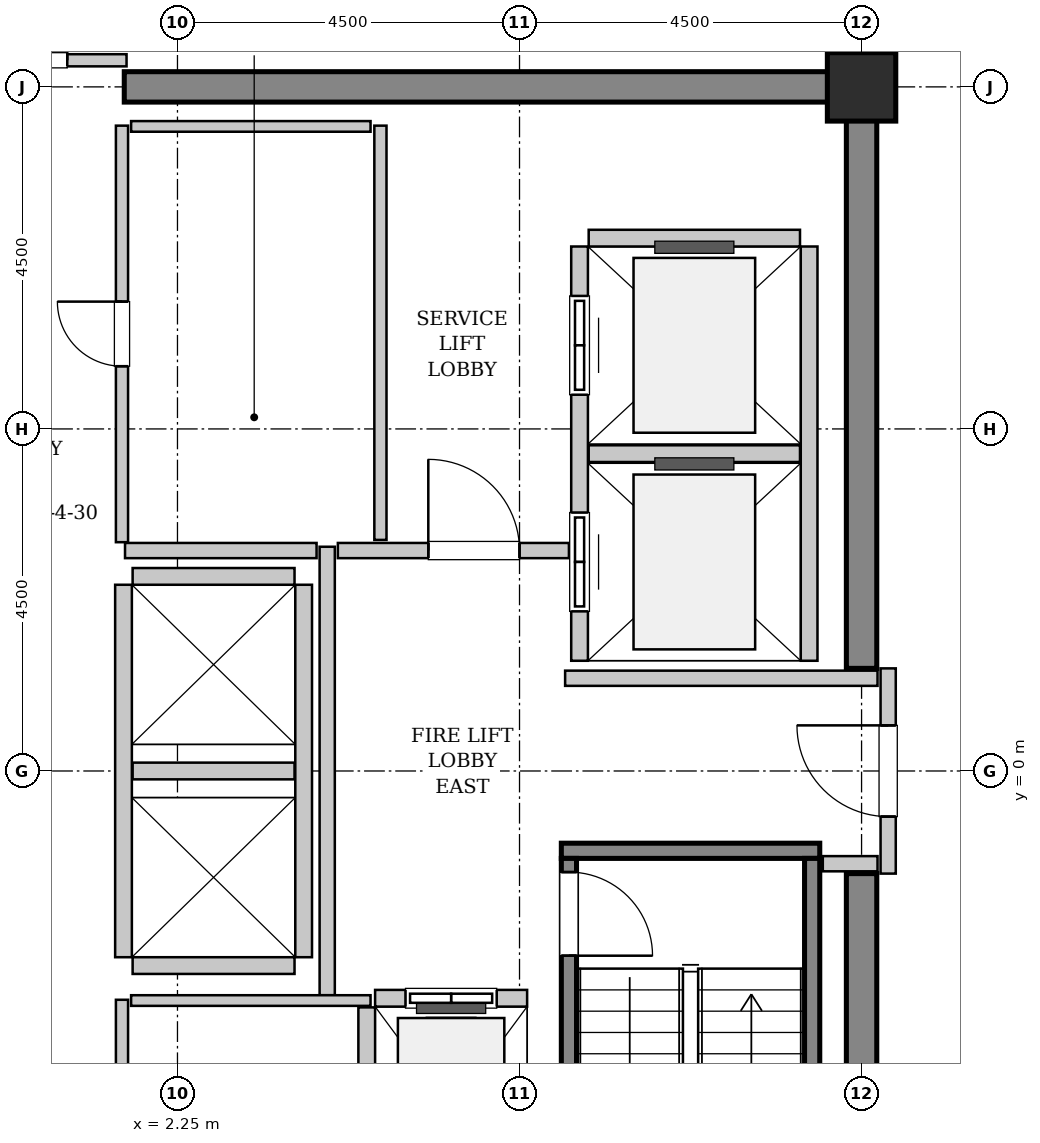
"""IFC4 building model, lengths in metres.
Left out: names, types, materials, properties, quantities, classifications, styles, units other than length and angle.
Written with IfcOpenShell. Run it as: python <this file> out.ifc"""

import sys

from ifc_helpers import new_model, si_unit, direction, frame, frame_2d, origin, origin_2d, place, context, subcontext, project, spatial, rectangle, extrude, source, transform, mapped, element, fill, save


model = new_model("IFC4")
c1 = context("Model", 3, precision=1e-05, world=origin(), true_north=direction((0.0, 1.0)))
c2 = subcontext(c1, "Body", "Model", "MODEL_VIEW")
j1 = project(units=[si_unit("LENGTHUNIT", "METRE"), si_unit("PLANEANGLEUNIT", "RADIAN")], contexts=[c1])
p1 = place(None, origin())
s1 = spatial("IfcSite", under=j1, at=p1, CompositionType="ELEMENT")
p2 = place(p1, origin())
s2 = spatial("IfcBuilding", under=s1, at=p2, CompositionType="ELEMENT")
p3 = place(p2, frame((0.0, 0.0, 337.6)))
s3 = spatial("IfcBuildingStorey", under=s2, at=p3, CompositionType="ELEMENT", Elevation=337.6)
m1 = source(origin(), c2, "Body", "SweptSolid", [
    extrude(rectangle(XDim=9.9, YDim=0.4, at=frame_2d((4.95, 0.0))), origin(), (0.0, 0.0, 1.0), 3.8),
])
p4 = place(p3, frame((1.55, 9.0, 0.0), z_axis=(0.0, 0.0, 1.0), x_axis=(1.0, 0.0, 0.0)))
e1 = element("IfcWall", 1, at=p4, inside=s3, PredefinedType="SHEAR", context=c2, shape_type="MappedRepresentation", body=[
    mapped(m1, transform((0.0, 0.0, 0.0), x_axis=(1.0, 0.0, 0.0), y_axis=(0.0, 1.0, 0.0), z_axis=(0.0, 0.0, 1.0), scale=1.0)),
])
m2 = source(origin(), c2, "Body", "SweptSolid", [
    extrude(rectangle(XDim=7.45, YDim=0.4, at=frame_2d((3.725, 0.0))), origin(), (0.0, 0.0, 1.0), 3.8),
])
for number, where, z_axis, x_axis in (
    (2, (11.25, -8.8, 0.0), (0.0, 0.0, 1.0), (0.0, 1.0, 0.0)),
    (3, (11.25, 1.35, 0.0), (0.0, 0.0, 1.0), (0.0, 1.0, 0.0)),
):
    element("IfcWall", number, at=place(p3, frame(where, z_axis=z_axis, x_axis=x_axis)), inside=s3, PredefinedType="SHEAR", context=c2, shape_type="MappedRepresentation", body=[
        mapped(m2, transform((0.0, 0.0, 0.0), x_axis=(1.0, 0.0, 0.0), y_axis=(0.0, 1.0, 0.0), z_axis=(0.0, 0.0, 1.0), scale=1.0)),
    ])
m3 = source(origin(), c2, "Body", "SweptSolid", [
    extrude(rectangle(XDim=0.9, YDim=0.9, at=origin_2d()), origin(), (0.0, 0.0, 1.0), 3.8),
])
p5 = place(p3, frame((11.25, 9.0, 0.0), z_axis=(0.0, 0.0, 1.0), x_axis=(1.0, 0.0, 0.0)))
e4 = element("IfcColumn", 4, at=p5, inside=s3, PredefinedType="COLUMN", context=c2, shape_type="MappedRepresentation", body=[
    mapped(m3, transform((0.0, 0.0, 0.0), x_axis=(1.0, 0.0, 0.0), y_axis=(0.0, 1.0, 0.0), z_axis=(0.0, 0.0, 1.0), scale=1.0)),
])
m4 = source(origin(), c2, "Body", "SweptSolid", [
    extrude(rectangle(XDim=3.4, YDim=0.2, at=frame_2d((1.7, 0.0))), origin(), (0.0, 0.0, 1.0), 3.8),
])
p6 = place(p3, frame((7.3, -1.05, 0.0), z_axis=(0.0, 0.0, 1.0), x_axis=(1.0, 0.0, 0.0)))
e5 = element("IfcWall", 5, at=p6, inside=s3, PredefinedType="SOLIDWALL", context=c2, shape_type="MappedRepresentation", body=[
    mapped(m4, transform((0.0, 0.0, 0.0), x_axis=(1.0, 0.0, 0.0), y_axis=(0.0, 1.0, 0.0), z_axis=(0.0, 0.0, 1.0), scale=1.0)),
])
m5 = source(origin(), c2, "Body", "SweptSolid", [
    extrude(rectangle(XDim=7.1, YDim=0.2, at=frame_2d((3.55, 0.0))), origin(), (0.0, 0.0, 1.0), 3.8),
])
p7 = place(p3, frame((7.4, -1.15, 0.0), z_axis=(0.0, 0.0, 1.0), x_axis=(0.0, -1.0, 0.0)))
e6 = element("IfcWall", 6, at=p7, inside=s3, PredefinedType="SOLIDWALL", context=c2, shape_type="MappedRepresentation", body=[
    mapped(m5, transform((0.0, 0.0, 0.0), x_axis=(1.0, 0.0, 0.0), y_axis=(0.0, 1.0, 0.0), z_axis=(0.0, 0.0, 1.0), scale=1.0)),
])
p8 = place(p7, frame((0.18, 0.0, 0.0)))
e7 = element("IfcOpeningElement", 7, at=p8, cuts=e6, PredefinedType="OPENING", context=c2, shape_type="SweptSolid", body=[
    extrude(rectangle(XDim=1.1, YDim=2.15, at=frame_2d((0.55, 1.075))), frame((0.0, 0.11, 0.0), z_axis=(0.0, -1.0, 0.0), x_axis=(1.0, 0.0, 0.0)), (0.0, 0.0, 1.0), 0.22),
])
p9 = place(p3, frame((10.6, -1.15, 0.0), z_axis=(0.0, 0.0, 1.0), x_axis=(0.0, -1.0, 0.0)))
e8 = element("IfcWall", 8, at=p9, inside=s3, PredefinedType="SOLIDWALL", context=c2, shape_type="MappedRepresentation", body=[
    mapped(m5, transform((0.0, 0.0, 0.0), x_axis=(1.0, 0.0, 0.0), y_axis=(0.0, 1.0, 0.0), z_axis=(0.0, 0.0, 1.0), scale=1.0)),
])
m6 = source(origin(), c2, "Body", "SweptSolid", [
    extrude(rectangle(XDim=2.0, YDim=0.22, at=frame_2d((1.0, 0.0))), origin(), (0.0, 0.0, 1.0), 3.535),
])
p10 = place(p3, frame((6.85, -2.99, 0.0), z_axis=(0.0, 0.0, 1.0), x_axis=(-1.0, 0.0, 0.0)))
e9 = element("IfcWall", 9, at=p10, inside=s3, PredefinedType="SOLIDWALL", context=c2, shape_type="MappedRepresentation", body=[
    mapped(m6, transform((0.0, 0.0, 0.0), x_axis=(1.0, 0.0, 0.0), y_axis=(0.0, 1.0, 0.0), z_axis=(0.0, 0.0, 1.0), scale=1.0)),
])
p11 = place(p10, frame((0.4, 0.0, 0.0)))
e10 = element("IfcOpeningElement", 10, at=p11, cuts=e9, PredefinedType="OPENING", context=c2, shape_type="SweptSolid", body=[
    extrude(rectangle(XDim=1.2, YDim=2.2, at=frame_2d((0.6, 1.1))), frame((0.0, 0.12, 0.0), z_axis=(0.0, -1.0, 0.0), x_axis=(1.0, 0.0, 0.0)), (0.0, 0.0, 1.0), 0.24),
])
m7 = source(origin(), c2, "Body", "SweptSolid", [
    extrude(rectangle(XDim=2.68, YDim=0.22, at=frame_2d((1.34, 0.0))), origin(), (0.0, 0.0, 1.0), 3.535),
])
p12 = place(p3, frame((4.74, -3.11, 0.0), z_axis=(0.0, 0.0, 1.0), x_axis=(0.0, -1.0, 0.0)))
e11 = element("IfcWall", 11, at=p12, inside=s3, PredefinedType="SOLIDWALL", context=c2, shape_type="MappedRepresentation", body=[
    mapped(m7, transform((0.0, 0.0, 0.0), x_axis=(1.0, 0.0, 0.0), y_axis=(0.0, 1.0, 0.0), z_axis=(0.0, 0.0, 1.0), scale=1.0)),
])
m8 = source(origin(), c2, "Body", "SweptSolid", [
    extrude(rectangle(XDim=5.45, YDim=0.22, at=frame_2d((2.725, 0.0))), origin(), (0.0, 0.0, 1.0), 3.535),
])
p13 = place(p3, frame((7.54, 6.9, 0.0), z_axis=(0.0, 0.0, 1.0), x_axis=(0.0, -1.0, 0.0)))
e12 = element("IfcWall", 12, at=p13, inside=s3, PredefinedType="SOLIDWALL", context=c2, shape_type="MappedRepresentation", body=[
    mapped(m8, transform((0.0, 0.0, 0.0), x_axis=(1.0, 0.0, 0.0), y_axis=(0.0, 1.0, 0.0), z_axis=(0.0, 0.0, 1.0), scale=1.0)),
])
p14 = place(p13, frame((3.5, 0.0, 0.0)))
e13 = element("IfcOpeningElement", 13, at=p14, cuts=e12, PredefinedType="OPENING", context=c2, shape_type="SweptSolid", body=[
    extrude(rectangle(XDim=1.3, YDim=2.3, at=frame_2d((0.65, 1.15))), frame((0.0, 0.12, 0.0), z_axis=(0.0, -1.0, 0.0), x_axis=(1.0, 0.0, 0.0)), (0.0, 0.0, 1.0), 0.24),
])
p15 = place(p13, frame((0.65, 0.0, 0.0)))
e14 = element("IfcOpeningElement", 14, at=p15, cuts=e12, PredefinedType="OPENING", context=c2, shape_type="SweptSolid", body=[
    extrude(rectangle(XDim=1.3, YDim=2.3, at=frame_2d((0.65, 1.15))), frame((0.0, 0.12, 0.0), z_axis=(0.0, -1.0, 0.0), x_axis=(1.0, 0.0, 0.0)), (0.0, 0.0, 1.0), 0.24),
])
p16 = place(p3, frame((10.56, 1.45, 0.0), z_axis=(0.0, 0.0, 1.0), x_axis=(0.0, 1.0, 0.0)))
e15 = element("IfcWall", 15, at=p16, inside=s3, PredefinedType="SOLIDWALL", context=c2, shape_type="MappedRepresentation", body=[
    mapped(m8, transform((0.0, 0.0, 0.0), x_axis=(1.0, 0.0, 0.0), y_axis=(0.0, 1.0, 0.0), z_axis=(0.0, 0.0, 1.0), scale=1.0)),
])
m9 = source(origin(), c2, "Body", "SweptSolid", [
    extrude(rectangle(XDim=2.78, YDim=0.22, at=frame_2d((1.39, 0.0))), origin(), (0.0, 0.0, 1.0), 3.535),
])
for number, where, z_axis, x_axis in (
    (16, (7.66, 4.175, 0.0), (0.0, 0.0, 1.0), (1.0, 0.0, 0.0)),
    (17, (10.44, 7.01, 0.0), (0.0, 0.0, 1.0), (-1.0, 0.0, 0.0)),
):
    element("IfcWall", number, at=place(p3, frame(where, z_axis=z_axis, x_axis=x_axis)), inside=s3, PredefinedType="SOLIDWALL", context=c2, shape_type="MappedRepresentation", body=[
        mapped(m9, transform((0.0, 0.0, 0.0), x_axis=(1.0, 0.0, 0.0), y_axis=(0.0, 1.0, 0.0), z_axis=(0.0, 0.0, 1.0), scale=1.0)),
    ])
m10 = source(origin(), c2, "Body", "SweptSolid", [
    extrude(rectangle(XDim=4.9, YDim=0.22, at=frame_2d((2.45, 0.0))), origin(), (0.0, 0.0, 1.0), 3.535),
])
for number, where, z_axis, x_axis in (
    (18, (1.54, 2.45, 0.0), (0.0, 0.0, 1.0), (0.0, -1.0, 0.0)),
    (19, (3.91, -2.45, 0.0), (0.0, 0.0, 1.0), (0.0, 1.0, 0.0)),
):
    element("IfcWall", number, at=place(p3, frame(where, z_axis=z_axis, x_axis=x_axis)), inside=s3, PredefinedType="SOLIDWALL", context=c2, shape_type="MappedRepresentation", body=[
        mapped(m10, transform((0.0, 0.0, 0.0), x_axis=(1.0, 0.0, 0.0), y_axis=(0.0, 1.0, 0.0), z_axis=(0.0, 0.0, 1.0), scale=1.0)),
    ])
m11 = source(origin(), c2, "Body", "SweptSolid", [
    extrude(rectangle(XDim=2.13, YDim=0.22, at=frame_2d((1.065, 0.0))), origin(), (0.0, 0.0, 1.0), 3.535),
])
for number, where, z_axis, x_axis in (
    (20, (1.66, -2.56, 0.0), (0.0, 0.0, 1.0), (1.0, 0.0, 0.0)),
    (21, (1.66, 0.0, 0.0), (0.0, 0.0, 1.0), (1.0, 0.0, 0.0)),
    (22, (3.79, 2.56, 0.0), (0.0, 0.0, 1.0), (-1.0, 0.0, 0.0)),
):
    element("IfcWall", number, at=place(p3, frame(where, z_axis=z_axis, x_axis=x_axis)), inside=s3, PredefinedType="SOLIDWALL", context=c2, shape_type="MappedRepresentation", body=[
        mapped(m11, transform((0.0, 0.0, 0.0), x_axis=(1.0, 0.0, 0.0), y_axis=(0.0, 1.0, 0.0), z_axis=(0.0, 0.0, 1.0), scale=1.0)),
    ])
m12 = source(origin(), c2, "Body", "SweptSolid", [
    extrude(rectangle(XDim=2.7, YDim=0.2, at=frame_2d((1.35, 0.0))), origin(), (0.0, 0.0, 1.0), 2.625),
])
p17 = place(p3, frame((11.6, -1.35, 0.0), z_axis=(0.0, 0.0, 1.0), x_axis=(0.0, 1.0, 0.0)))
e23 = element("IfcWall", 23, at=p17, inside=s3, PredefinedType="PARTITIONING", context=c2, shape_type="MappedRepresentation", body=[
    mapped(m12, transform((0.0, 0.0, 0.0), x_axis=(1.0, 0.0, 0.0), y_axis=(0.0, 1.0, 0.0), z_axis=(0.0, 0.0, 1.0), scale=1.0)),
])
p18 = place(p17, frame((0.75, 0.0, 0.0)))
e24 = element("IfcOpeningElement", 24, at=p18, cuts=e23, PredefinedType="OPENING", context=c2, shape_type="SweptSolid", body=[
    extrude(rectangle(XDim=1.2, YDim=2.15, at=frame_2d((0.6, 1.075))), frame((0.0, 0.11, 0.0), z_axis=(0.0, -1.0, 0.0), x_axis=(1.0, 0.0, 0.0)), (0.0, 0.0, 1.0), 0.22),
])
m13 = source(origin(), c2, "Body", "SweptSolid", [
    extrude(rectangle(XDim=5.9, YDim=0.2, at=frame_2d((2.95, 0.0))), origin(), (0.0, 0.0, 1.0), 3.535),
])
p19 = place(p3, frame((4.22, -2.95, 0.0), z_axis=(0.0, 0.0, 1.0), x_axis=(0.0, 1.0, 0.0)))
e25 = element("IfcWall", 25, at=p19, inside=s3, PredefinedType="PARTITIONING", context=c2, shape_type="MappedRepresentation", body=[
    mapped(m13, transform((0.0, 0.0, 0.0), x_axis=(1.0, 0.0, 0.0), y_axis=(0.0, 1.0, 0.0), z_axis=(0.0, 0.0, 1.0), scale=1.0)),
])
m14 = source(origin(), c2, "Body", "SweptSolid", [
    extrude(rectangle(XDim=2.52, YDim=0.2, at=frame_2d((1.26, 0.0))), origin(), (0.0, 0.0, 1.0), 3.535),
])
p20 = place(p3, frame((1.56, 2.9, 0.0), z_axis=(0.0, 0.0, 1.0), x_axis=(1.0, 0.0, 0.0)))
e26 = element("IfcWall", 26, at=p20, inside=s3, PredefinedType="PARTITIONING", context=c2, shape_type="MappedRepresentation", body=[
    mapped(m14, transform((0.0, 0.0, 0.0), x_axis=(1.0, 0.0, 0.0), y_axis=(0.0, 1.0, 0.0), z_axis=(0.0, 0.0, 1.0), scale=1.0)),
])
m15 = source(origin(), c2, "Body", "SweptSolid", [
    extrude(rectangle(XDim=3.04, YDim=0.2, at=frame_2d((1.52, 0.0))), origin(), (0.0, 0.0, 1.0), 3.535),
])
p21 = place(p3, frame((4.36, 2.9, 0.0), z_axis=(0.0, 0.0, 1.0), x_axis=(1.0, 0.0, 0.0)))
e27 = element("IfcWall", 27, at=p21, inside=s3, PredefinedType="PARTITIONING", context=c2, shape_type="MappedRepresentation", body=[
    mapped(m15, transform((0.0, 0.0, 0.0), x_axis=(1.0, 0.0, 0.0), y_axis=(0.0, 1.0, 0.0), z_axis=(0.0, 0.0, 1.0), scale=1.0)),
])
p22 = place(p21, frame((1.19, 0.0, 0.0)))
e28 = element("IfcOpeningElement", 28, at=p22, cuts=e27, PredefinedType="OPENING", context=c2, shape_type="SweptSolid", body=[
    extrude(rectangle(XDim=1.2, YDim=2.15, at=frame_2d((0.6, 1.075))), frame((0.0, 0.11, 0.0), z_axis=(0.0, -1.0, 0.0), x_axis=(1.0, 0.0, 0.0)), (0.0, 0.0, 1.0), 0.22),
])
m16 = source(origin(), c2, "Body", "SweptSolid", [
    extrude(rectangle(XDim=4.11, YDim=0.2, at=frame_2d((2.055, 0.0))), origin(), (0.0, 0.0, 1.0), 3.535),
])
p23 = place(p3, frame((7.35, 1.22, 0.0), z_axis=(0.0, 0.0, 1.0), x_axis=(1.0, 0.0, 0.0)))
e29 = element("IfcWall", 29, at=p23, inside=s3, PredefinedType="PARTITIONING", context=c2, shape_type="MappedRepresentation", body=[
    mapped(m16, transform((0.0, 0.0, 0.0), x_axis=(1.0, 0.0, 0.0), y_axis=(0.0, 1.0, 0.0), z_axis=(0.0, 0.0, 1.0), scale=1.0)),
])
m17 = source(origin(), c2, "Body", "SweptSolid", [
    extrude(rectangle(XDim=0.72, YDim=0.2, at=frame_2d((0.36, 0.0))), origin(), (0.0, 0.0, 1.0), 3.535),
])
p24 = place(p3, frame((10.74, -1.22, 0.0), z_axis=(0.0, 0.0, 1.0), x_axis=(1.0, 0.0, 0.0)))
e30 = element("IfcWall", 30, at=p24, inside=s3, PredefinedType="PARTITIONING", context=c2, shape_type="MappedRepresentation", body=[
    mapped(m17, transform((0.0, 0.0, 0.0), x_axis=(1.0, 0.0, 0.0), y_axis=(0.0, 1.0, 0.0), z_axis=(0.0, 0.0, 1.0), scale=1.0)),
])
m18 = source(origin(), c2, "Body", "SweptSolid", [
    extrude(rectangle(XDim=3.16, YDim=0.16, at=frame_2d((1.58, 0.0))), origin(), (0.0, 0.0, 1.0), 2.625),
])
p25 = place(p3, frame((-1.58, 9.35, 0.0), z_axis=(0.0, 0.0, 1.0), x_axis=(1.0, 0.0, 0.0)))
e31 = element("IfcWall", 31, at=p25, inside=s3, PredefinedType="PARTITIONING", context=c2, shape_type="MappedRepresentation", body=[
    mapped(m18, transform((0.0, 0.0, 0.0), x_axis=(1.0, 0.0, 0.0), y_axis=(0.0, 1.0, 0.0), z_axis=(0.0, 0.0, 1.0), scale=1.0)),
])
p26 = place(p25, frame((0.78, 0.0, 0.0)))
e32 = element("IfcOpeningElement", 32, at=p26, cuts=e31, PredefinedType="OPENING", context=c2, shape_type="SweptSolid", body=[
    extrude(rectangle(XDim=1.6, YDim=2.3, at=frame_2d((0.8, 1.15))), frame((0.0, 0.09, 0.0), z_axis=(0.0, -1.0, 0.0), x_axis=(1.0, 0.0, 0.0)), (0.0, 0.0, 1.0), 0.18),
])
m19 = source(origin(), c2, "Body", "SweptSolid", [
    extrude(rectangle(XDim=5.45, YDim=0.16, at=frame_2d((2.725, 0.0))), origin(), (0.0, 0.0, 1.0), 3.535),
])
p27 = place(p3, frame((4.92, 3.04, 0.0), z_axis=(0.0, 0.0, 1.0), x_axis=(0.0, 1.0, 0.0)))
e33 = element("IfcWall", 33, at=p27, inside=s3, PredefinedType="PARTITIONING", context=c2, shape_type="MappedRepresentation", body=[
    mapped(m19, transform((0.0, 0.0, 0.0), x_axis=(1.0, 0.0, 0.0), y_axis=(0.0, 1.0, 0.0), z_axis=(0.0, 0.0, 1.0), scale=1.0)),
])
m20 = source(origin(), c2, "Body", "SweptSolid", [
    extrude(rectangle(XDim=5.48, YDim=0.16, at=frame_2d((2.74, 0.0))), origin(), (0.0, 0.0, 1.0), 3.535),
])
p28 = place(p3, frame((1.52, 3.01, 0.0), z_axis=(0.0, 0.0, 1.0), x_axis=(0.0, 1.0, 0.0)))
e34 = element("IfcWall", 34, at=p28, inside=s3, PredefinedType="PARTITIONING", context=c2, shape_type="MappedRepresentation", body=[
    mapped(m20, transform((0.0, 0.0, 0.0), x_axis=(1.0, 0.0, 0.0), y_axis=(0.0, 1.0, 0.0), z_axis=(0.0, 0.0, 1.0), scale=1.0)),
])
p29 = place(p28, frame((2.315, 0.0, 0.0)))
e35 = element("IfcOpeningElement", 35, at=p29, cuts=e34, PredefinedType="OPENING", context=c2, shape_type="SweptSolid", body=[
    extrude(rectangle(XDim=0.85, YDim=2.1, at=frame_2d((0.425, 1.05))), frame((0.0, 0.09, 0.0), z_axis=(0.0, -1.0, 0.0), x_axis=(1.0, 0.0, 0.0)), (0.0, 0.0, 1.0), 0.18),
])
m21 = source(origin(), c2, "Body", "SweptSolid", [
    extrude(rectangle(XDim=3.15, YDim=0.14, at=frame_2d((1.575, 0.0))), origin(), (0.0, 0.0, 1.0), 3.535),
])
p30 = place(p3, frame((1.64, 8.48, 0.0), z_axis=(0.0, 0.0, 1.0), x_axis=(1.0, 0.0, 0.0)))
e36 = element("IfcWall", 36, at=p30, inside=s3, PredefinedType="PARTITIONING", context=c2, shape_type="MappedRepresentation", body=[
    mapped(m21, transform((0.0, 0.0, 0.0), x_axis=(1.0, 0.0, 0.0), y_axis=(0.0, 1.0, 0.0), z_axis=(0.0, 0.0, 1.0), scale=1.0)),
])
p31 = place(p3, frame((1.52, -8.49, 0.0), z_axis=(0.0, 0.0, 1.0), x_axis=(0.0, 1.0, 0.0)))
e37 = element("IfcWall", 37, at=p31, inside=s3, PredefinedType="PARTITIONING", context=c2, shape_type="MappedRepresentation", body=[
    mapped(m20, transform((0.0, 0.0, 0.0), x_axis=(1.0, 0.0, 0.0), y_axis=(0.0, 1.0, 0.0), z_axis=(0.0, 0.0, 1.0), scale=1.0)),
])
p32 = place(p31, frame((2.315, 0.0, 0.0)))
e38 = element("IfcOpeningElement", 38, at=p32, cuts=e37, PredefinedType="OPENING", context=c2, shape_type="SweptSolid", body=[
    extrude(rectangle(XDim=0.85, YDim=2.1, at=frame_2d((0.425, 1.05))), frame((0.0, 0.09, 0.0), z_axis=(0.0, -1.0, 0.0), x_axis=(1.0, 0.0, 0.0)), (0.0, 0.0, 1.0), 0.18),
])
p33 = place(p3, frame((1.64, -3.02, 0.0), z_axis=(0.0, 0.0, 1.0), x_axis=(1.0, 0.0, 0.0)))
e39 = element("IfcWall", 39, at=p33, inside=s3, PredefinedType="PARTITIONING", context=c2, shape_type="MappedRepresentation", body=[
    mapped(m21, transform((0.0, 0.0, 0.0), x_axis=(1.0, 0.0, 0.0), y_axis=(0.0, 1.0, 0.0), z_axis=(0.0, 0.0, 1.0), scale=1.0)),
])
m22 = source(origin(), c2, "Body", "SweptSolid", [
    extrude(rectangle(XDim=1.1, YDim=2.15, at=frame_2d((0.55, 1.075))), frame((0.0, 0.025, 0.0), z_axis=(0.0, -1.0, 0.0), x_axis=(1.0, 0.0, 0.0)), (0.0, 0.0, 1.0), 0.05),
])
p34 = place(p8, origin())
e40 = element("IfcDoor", 40, at=p34, inside=s3, OperationType="SINGLE_SWING_RIGHT", PredefinedType="DOOR", context=c2, shape_type="MappedRepresentation", body=[
    mapped(m22, transform((0.0, 0.0, 0.0), x_axis=(1.0, 0.0, 0.0), y_axis=(0.0, 1.0, 0.0), z_axis=(0.0, 0.0, 1.0), scale=1.0)),
])
fill(e7, e40)
m23 = source(origin(), c2, "Body", "SweptSolid", [
    extrude(rectangle(XDim=1.2, YDim=2.2, at=frame_2d((0.6, 1.1))), frame((0.0, 0.025, 0.0), z_axis=(0.0, -1.0, 0.0), x_axis=(1.0, 0.0, 0.0)), (0.0, 0.0, 1.0), 0.05),
])
p35 = place(p11, origin())
e41 = element("IfcDoor", 41, at=p35, inside=s3, OperationType="SLIDING_TO_LEFT", PredefinedType="DOOR", context=c2, shape_type="MappedRepresentation", body=[
    mapped(m23, transform((0.0, 0.0, 0.0), x_axis=(1.0, 0.0, 0.0), y_axis=(0.0, 1.0, 0.0), z_axis=(0.0, 0.0, 1.0), scale=1.0)),
])
fill(e10, e41)
m24 = source(origin(), c2, "Body", "SweptSolid", [
    extrude(rectangle(XDim=1.3, YDim=2.3, at=frame_2d((0.65, 1.15))), frame((0.0, 0.025, 0.0), z_axis=(0.0, -1.0, 0.0), x_axis=(1.0, 0.0, 0.0)), (0.0, 0.0, 1.0), 0.05),
])
p36 = place(p14, origin())
e42 = element("IfcDoor", 42, at=p36, inside=s3, OperationType="SLIDING_TO_RIGHT", PredefinedType="DOOR", context=c2, shape_type="MappedRepresentation", body=[
    mapped(m24, transform((0.0, 0.0, 0.0), x_axis=(1.0, 0.0, 0.0), y_axis=(0.0, 1.0, 0.0), z_axis=(0.0, 0.0, 1.0), scale=1.0)),
])
fill(e13, e42)
p37 = place(p15, origin())
e43 = element("IfcDoor", 43, at=p37, inside=s3, OperationType="SLIDING_TO_RIGHT", PredefinedType="DOOR", context=c2, shape_type="MappedRepresentation", body=[
    mapped(m24, transform((0.0, 0.0, 0.0), x_axis=(1.0, 0.0, 0.0), y_axis=(0.0, 1.0, 0.0), z_axis=(0.0, 0.0, 1.0), scale=1.0)),
])
fill(e14, e43)
m25 = source(origin(), c2, "Body", "SweptSolid", [
    extrude(rectangle(XDim=1.2, YDim=2.15, at=frame_2d((0.6, 1.075))), frame((0.0, 0.025, 0.0), z_axis=(0.0, -1.0, 0.0), x_axis=(1.0, 0.0, 0.0)), (0.0, 0.0, 1.0), 0.05),
])
p38 = place(p18, origin())
e44 = element("IfcDoor", 44, at=p38, inside=s3, OperationType="SINGLE_SWING_RIGHT", PredefinedType="DOOR", context=c2, shape_type="MappedRepresentation", body=[
    mapped(m25, transform((0.0, 0.0, 0.0), x_axis=(1.0, 0.0, 0.0), y_axis=(0.0, 1.0, 0.0), z_axis=(0.0, 0.0, 1.0), scale=1.0)),
])
fill(e24, e44)
p39 = place(p22, origin())
e45 = element("IfcDoor", 45, at=p39, inside=s3, OperationType="SINGLE_SWING_LEFT", PredefinedType="DOOR", context=c2, shape_type="MappedRepresentation", body=[
    mapped(m25, transform((0.0, 0.0, 0.0), x_axis=(1.0, 0.0, 0.0), y_axis=(0.0, 1.0, 0.0), z_axis=(0.0, 0.0, 1.0), scale=1.0)),
])
fill(e28, e45)
m26 = source(origin(), c2, "Body", "SweptSolid", [
    extrude(rectangle(XDim=1.6, YDim=2.3, at=frame_2d((0.8, 1.15))), frame((0.0, 0.025, 0.0), z_axis=(0.0, -1.0, 0.0), x_axis=(1.0, 0.0, 0.0)), (0.0, 0.0, 1.0), 0.05),
])
p40 = place(p26, origin())
e46 = element("IfcDoor", 46, at=p40, inside=s3, OperationType="DOUBLE_DOOR_SINGLE_SWING", PredefinedType="DOOR", context=c2, shape_type="MappedRepresentation", body=[
    mapped(m26, transform((0.0, 0.0, 0.0), x_axis=(1.0, 0.0, 0.0), y_axis=(0.0, 1.0, 0.0), z_axis=(0.0, 0.0, 1.0), scale=1.0)),
])
fill(e32, e46)
m27 = source(origin(), c2, "Body", "SweptSolid", [
    extrude(rectangle(XDim=0.85, YDim=2.1, at=frame_2d((0.425, 1.05))), frame((0.0, 0.025, 0.0), z_axis=(0.0, -1.0, 0.0), x_axis=(1.0, 0.0, 0.0)), (0.0, 0.0, 1.0), 0.05),
])
p41 = place(p29, origin())
e47 = element("IfcDoor", 47, at=p41, inside=s3, OperationType="SINGLE_SWING_RIGHT", PredefinedType="DOOR", context=c2, shape_type="MappedRepresentation", body=[
    mapped(m27, transform((0.0, 0.0, 0.0), x_axis=(1.0, 0.0, 0.0), y_axis=(0.0, 1.0, 0.0), z_axis=(0.0, 0.0, 1.0), scale=1.0)),
])
fill(e35, e47)
save(model, sys.argv[1])
